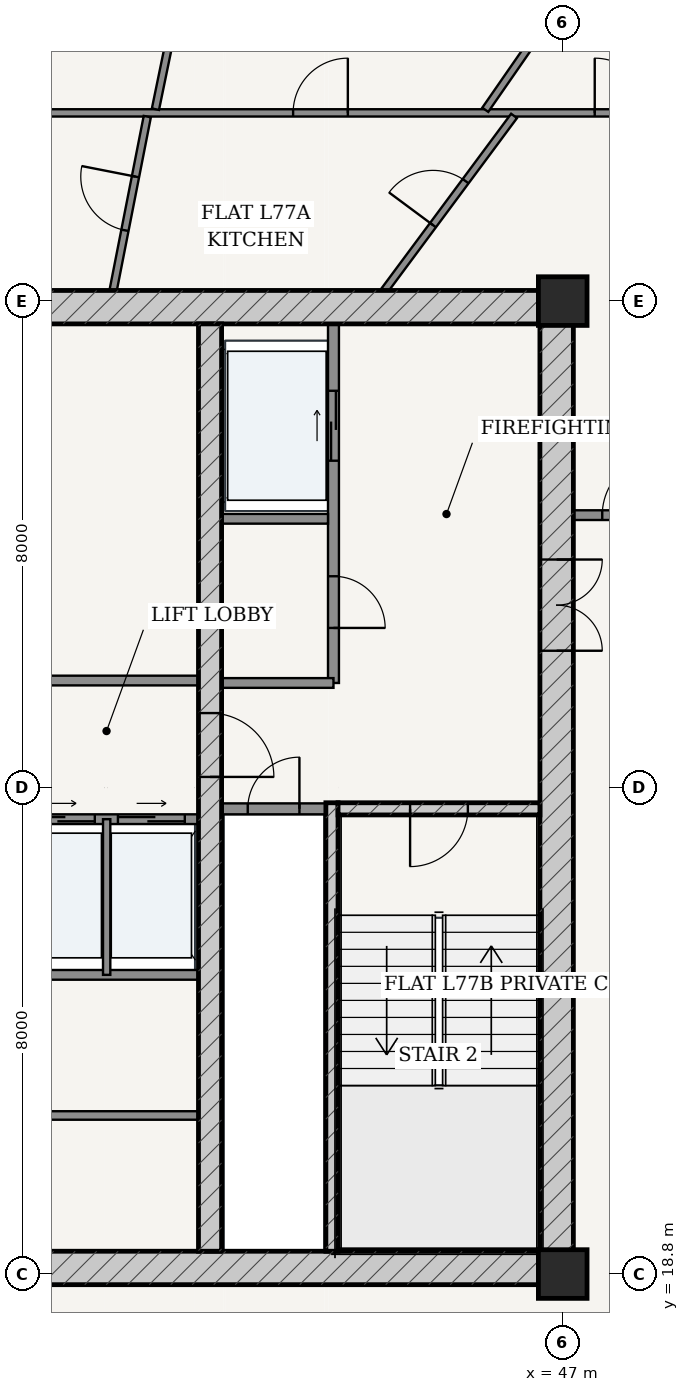
"""IFC4 building model, lengths in metres.
Left out: names, types, materials, properties, quantities, classifications, styles, units other than length and angle.
Written with IfcOpenShell. Run it as: python <this file> out.ifc"""

import sys

from ifc_helpers import new_model, si_unit, direction, frame, frame_2d, origin, origin_2d, place, context, subcontext, project, spatial, rectangle, extrude, source, transform, mapped, element, fill, save


model = new_model("IFC4")
c1 = context("Model", 3, precision=1e-05, world=origin(), true_north=direction((-0.2419218956, 0.970295726276)))
c2 = subcontext(c1, "Body", "Model", "MODEL_VIEW")
j1 = project(units=[si_unit("LENGTHUNIT", "METRE"), si_unit("PLANEANGLEUNIT", "RADIAN")], contexts=[c1])
p1 = place(None, origin())
s1 = spatial("IfcSite", under=j1, at=p1, CompositionType="ELEMENT")
p2 = place(p1, origin())
s2 = spatial("IfcBuilding", under=s1, at=p2, CompositionType="ELEMENT")
p3 = place(p2, frame((0.0, 0.0, 293.2)))
s3 = spatial("IfcBuildingStorey", under=s2, at=p3, CompositionType="ELEMENT", Elevation=293.2)
for number, where, z_axis, x_axis in (
    (1, (47.0, 18.8, 0.0), (0.0, 0.0, 1.0), (1.0, 0.0, 0.0)),
    (2, (47.0, 34.8, 0.0), (0.0, 0.0, 1.0), (1.0, 0.0, 0.0)),
):
    element("IfcColumn", number, at=place(p3, frame(where, z_axis=z_axis, x_axis=x_axis)), inside=s3, PredefinedType="COLUMN", context=c2, shape_type="SweptSolid", body=[
        extrude(rectangle(XDim=0.8, YDim=0.8, at=origin_2d()), origin(), (0.0, 0.0, 1.0), 3.75),
    ])
p4 = place(p3, frame((28.825, 18.9, 0.0), z_axis=(0.0, 0.0, 1.0), x_axis=(1.0, 0.0, 0.0)))
e3 = element("IfcWall", 3, at=p4, inside=s3, PredefinedType="SHEAR", context=c2, shape_type="SweptSolid", body=[
    extrude(rectangle(XDim=18.35, YDim=0.55, at=frame_2d((9.175, 0.0))), origin(), (0.0, 0.0, 1.0), 3.49),
])
p5 = place(p4, frame((8.75, 0.0, 0.0)))
e4 = element("IfcOpeningElement", 4, at=p5, cuts=e3, PredefinedType="OPENING", context=c2, shape_type="SweptSolid", body=[
    extrude(rectangle(XDim=0.85, YDim=2.1, at=frame_2d((0.425, 1.05))), frame((0.0, 0.285, 0.0), z_axis=(0.0, -1.0, 0.0), x_axis=(1.0, 0.0, 0.0)), (0.0, 0.0, 1.0), 0.57),
])
p6 = place(p3, frame((28.825, 34.7, 0.0), z_axis=(0.0, 0.0, 1.0), x_axis=(1.0, 0.0, 0.0)))
e5 = element("IfcWall", 5, at=p6, inside=s3, PredefinedType="SHEAR", context=c2, shape_type="SweptSolid", body=[
    extrude(rectangle(XDim=18.35, YDim=0.55, at=frame_2d((9.175, 0.0))), origin(), (0.0, 0.0, 1.0), 3.49),
])
p7 = place(p3, frame((46.9, 19.175, 0.0), z_axis=(0.0, 0.0, 1.0), x_axis=(0.0, 1.0, 0.0)))
e6 = element("IfcWall", 6, at=p7, inside=s3, PredefinedType="SHEAR", context=c2, shape_type="SweptSolid", body=[
    extrude(rectangle(XDim=15.25, YDim=0.55, at=frame_2d((7.625, 0.0))), origin(), (0.0, 0.0, 1.0), 3.49),
])
p8 = place(p7, frame((9.875, 0.0, 0.0)))
e7 = element("IfcOpeningElement", 7, at=p8, cuts=e6, PredefinedType="OPENING", context=c2, shape_type="SweptSolid", body=[
    extrude(rectangle(XDim=1.5, YDim=2.2, at=frame_2d((0.75, 1.1))), frame((0.0, 0.285, 0.0), z_axis=(0.0, -1.0, 0.0), x_axis=(1.0, 0.0, 0.0)), (0.0, 0.0, 1.0), 0.57),
])
p9 = place(p3, frame((43.205, 19.175, 0.0), z_axis=(0.0, 0.0, 1.0), x_axis=(0.0, 1.0, 0.0)))
e8 = element("IfcWall", 8, at=p9, inside=s3, PredefinedType="SOLIDWALL", context=c2, shape_type="SweptSolid", body=[
    extrude(rectangle(XDim=7.375, YDim=0.2, at=frame_2d((3.688, 0.0))), origin(), (0.0, 0.0, 1.0), 3.49),
])
p10 = place(p3, frame((43.305, 26.45, 0.0), z_axis=(0.0, 0.0, 1.0), x_axis=(1.0, 0.0, 0.0)))
e9 = element("IfcWall", 9, at=p10, inside=s3, PredefinedType="SOLIDWALL", context=c2, shape_type="SweptSolid", body=[
    extrude(rectangle(XDim=3.32, YDim=0.2, at=frame_2d((1.66, 0.0))), origin(), (0.0, 0.0, 1.0), 3.49),
])
p11 = place(p10, frame((1.185, 0.0, 0.0)))
e10 = element("IfcOpeningElement", 10, at=p11, cuts=e9, PredefinedType="OPENING", context=c2, shape_type="SweptSolid", body=[
    extrude(rectangle(XDim=0.95, YDim=2.15, at=frame_2d((0.475, 1.075))), frame((0.0, 0.11, 0.0), z_axis=(0.0, -1.0, 0.0), x_axis=(1.0, 0.0, 0.0)), (0.0, 0.0, 1.0), 0.22),
])
p12 = place(p3, frame((41.2, 19.175, 0.0), z_axis=(0.0, 0.0, 1.0), x_axis=(0.0, 1.0, 0.0)))
e11 = element("IfcWall", 11, at=p12, inside=s3, PredefinedType="SHEAR", context=c2, shape_type="SweptSolid", body=[
    extrude(rectangle(XDim=15.25, YDim=0.38, at=frame_2d((7.625, 0.0))), origin(), (0.0, 0.0, 1.0), 3.49),
])
p13 = place(p12, frame((7.8, 0.0, 0.0)))
e12 = element("IfcOpeningElement", 12, at=p13, cuts=e11, PredefinedType="OPENING", context=c2, shape_type="SweptSolid", body=[
    extrude(rectangle(XDim=1.05, YDim=2.15, at=frame_2d((0.525, 1.075))), frame((0.0, 0.2, 0.0), z_axis=(0.0, -1.0, 0.0), x_axis=(1.0, 0.0, 0.0)), (0.0, 0.0, 1.0), 0.4),
])
p14 = place(p3, frame((41.39, 26.45, 0.0), z_axis=(0.0, 0.0, 1.0), x_axis=(1.0, 0.0, 0.0)))
e13 = element("IfcWall", 13, at=p14, inside=s3, PredefinedType="PARTITIONING", context=c2, shape_type="SweptSolid", body=[
    extrude(rectangle(XDim=1.71, YDim=0.18, at=frame_2d((0.855, 0.0))), origin(), (0.0, 0.0, 1.0), 3.49),
])
p15 = place(p14, frame((0.43, 0.0, 0.0)))
e14 = element("IfcOpeningElement", 14, at=p15, cuts=e13, PredefinedType="OPENING", context=c2, shape_type="SweptSolid", body=[
    extrude(rectangle(XDim=0.85, YDim=2.1, at=frame_2d((0.425, 1.05))), frame((0.0, 0.1, 0.0), z_axis=(0.0, -1.0, 0.0), x_axis=(1.0, 0.0, 0.0)), (0.0, 0.0, 1.0), 0.2),
])
p16 = place(p3, frame((43.23, 28.52, 0.0), z_axis=(0.0, 0.0, 1.0), x_axis=(0.0, 1.0, 0.0)))
e15 = element("IfcWall", 15, at=p16, inside=s3, PredefinedType="PARTITIONING", context=c2, shape_type="SweptSolid", body=[
    extrude(rectangle(XDim=5.905, YDim=0.18, at=frame_2d((2.953, 0.0))), origin(), (0.0, 0.0, 1.0), 3.49),
])
p17 = place(p16, frame((0.905, 0.0, 0.0)))
e16 = element("IfcOpeningElement", 16, at=p17, cuts=e15, PredefinedType="OPENING", context=c2, shape_type="SweptSolid", body=[
    extrude(rectangle(XDim=0.85, YDim=2.1, at=frame_2d((0.425, 1.05))), frame((0.0, 0.1, 0.0), z_axis=(0.0, -1.0, 0.0), x_axis=(1.0, 0.0, 0.0)), (0.0, 0.0, 1.0), 0.2),
])
p18 = place(p16, frame((3.655, 0.0, 0.0)))
e17 = element("IfcOpeningElement", 17, at=p18, cuts=e15, PredefinedType="OPENING", context=c2, shape_type="SweptSolid", body=[
    extrude(rectangle(XDim=1.15, YDim=2.2, at=frame_2d((0.575, 1.1))), frame((0.0, 0.1, 0.0), z_axis=(0.0, -1.0, 0.0), x_axis=(1.0, 0.0, 0.0)), (0.0, 0.0, 1.0), 0.2),
])
p19 = place(p3, frame((41.39, 31.22, 0.0), z_axis=(0.0, 0.0, 1.0), x_axis=(1.0, 0.0, 0.0)))
e18 = element("IfcWall", 18, at=p19, inside=s3, PredefinedType="PARTITIONING", context=c2, shape_type="SweptSolid", body=[
    extrude(rectangle(XDim=1.75, YDim=0.16, at=frame_2d((0.875, 0.0))), origin(), (0.0, 0.0, 1.0), 3.49),
])
p20 = place(p3, frame((41.39, 28.52, 0.0), z_axis=(0.0, 0.0, 1.0), x_axis=(1.0, 0.0, 0.0)))
e19 = element("IfcWall", 19, at=p20, inside=s3, PredefinedType="PARTITIONING", context=c2, shape_type="SweptSolid", body=[
    extrude(rectangle(XDim=1.84, YDim=0.16, at=frame_2d((0.92, 0.0))), origin(), (0.0, 0.0, 1.0), 3.49),
])
p21 = place(p3, frame((34.99, 28.56, 0.0), z_axis=(0.0, 0.0, 1.0), x_axis=(1.0, 0.0, 0.0)))
e20 = element("IfcWall", 20, at=p21, inside=s3, PredefinedType="PARTITIONING", context=c2, shape_type="SweptSolid", body=[
    extrude(rectangle(XDim=6.02, YDim=0.16, at=frame_2d((3.01, 0.0))), origin(), (0.0, 0.0, 1.0), 3.49),
])
p22 = place(p21, frame((2.585, 0.0, 0.0)))
e21 = element("IfcOpeningElement", 21, at=p22, cuts=e20, PredefinedType="OPENING", context=c2, shape_type="SweptSolid", body=[
    extrude(rectangle(XDim=0.85, YDim=2.1, at=frame_2d((0.425, 1.05))), frame((0.0, 0.09, 0.0), z_axis=(0.0, -1.0, 0.0), x_axis=(1.0, 0.0, 0.0)), (0.0, 0.0, 1.0), 0.18),
])
p23 = place(p3, frame((34.99, 26.28, 0.0), z_axis=(0.0, 0.0, 1.0), x_axis=(1.0, 0.0, 0.0)))
e22 = element("IfcWall", 22, at=p23, inside=s3, PredefinedType="PARTITIONING", context=c2, shape_type="SweptSolid", body=[
    extrude(rectangle(XDim=6.02, YDim=0.16, at=frame_2d((3.01, 0.0))), origin(), (0.0, 0.0, 1.0), 3.49),
])
p24 = place(p23, frame((1.045, 0.0, 0.0)))
e23 = element("IfcOpeningElement", 23, at=p24, cuts=e22, PredefinedType="OPENING", context=c2, shape_type="SweptSolid", body=[
    extrude(rectangle(XDim=0.85, YDim=2.1, at=frame_2d((0.425, 1.05))), frame((0.0, 0.09, 0.0), z_axis=(0.0, -1.0, 0.0), x_axis=(1.0, 0.0, 0.0)), (0.0, 0.0, 1.0), 0.18),
])
p25 = place(p23, frame((3.215, 0.0, 0.0)))
e24 = element("IfcOpeningElement", 24, at=p25, cuts=e22, PredefinedType="OPENING", context=c2, shape_type="SweptSolid", body=[
    extrude(rectangle(XDim=1.1, YDim=2.2, at=frame_2d((0.55, 1.1))), frame((0.0, 0.09, 0.0), z_axis=(0.0, -1.0, 0.0), x_axis=(1.0, 0.0, 0.0)), (0.0, 0.0, 1.0), 0.18),
])
p26 = place(p23, frame((4.695, 0.0, 0.0)))
e25 = element("IfcOpeningElement", 25, at=p26, cuts=e22, PredefinedType="OPENING", context=c2, shape_type="SweptSolid", body=[
    extrude(rectangle(XDim=1.1, YDim=2.2, at=frame_2d((0.55, 1.1))), frame((0.0, 0.09, 0.0), z_axis=(0.0, -1.0, 0.0), x_axis=(1.0, 0.0, 0.0)), (0.0, 0.0, 1.0), 0.18),
])
p27 = place(p3, frame((34.99, 23.72, 0.0), z_axis=(0.0, 0.0, 1.0), x_axis=(1.0, 0.0, 0.0)))
e26 = element("IfcWall", 26, at=p27, inside=s3, PredefinedType="PARTITIONING", context=c2, shape_type="SweptSolid", body=[
    extrude(rectangle(XDim=6.02, YDim=0.16, at=frame_2d((3.01, 0.0))), origin(), (0.0, 0.0, 1.0), 3.49),
])
p28 = place(p3, frame((39.5, 23.72, 0.0), z_axis=(0.0, 0.0, 1.0), x_axis=(0.0, 1.0, 0.0)))
e27 = element("IfcWall", 27, at=p28, inside=s3, PredefinedType="PARTITIONING", context=c2, shape_type="SweptSolid", body=[
    extrude(rectangle(XDim=2.56, YDim=0.12, at=frame_2d((1.28, 0.0))), origin(), (0.0, 0.0, 1.0), 3.49),
])
p29 = place(p3, frame((34.99, 21.407, 0.0), z_axis=(0.0, 0.0, 1.0), x_axis=(1.0, 0.0, 0.0)))
e28 = element("IfcWall", 28, at=p29, inside=s3, PredefinedType="PARTITIONING", context=c2, shape_type="SweptSolid", body=[
    extrude(rectangle(XDim=6.02, YDim=0.14, at=frame_2d((3.01, 0.0))), origin(), (0.0, 0.0, 1.0), 3.49),
])
p30 = place(p29, frame((2.585, 0.0, 0.0)))
e29 = element("IfcOpeningElement", 29, at=p30, cuts=e28, PredefinedType="OPENING", context=c2, shape_type="SweptSolid", body=[
    extrude(rectangle(XDim=0.85, YDim=2.1, at=frame_2d((0.425, 1.05))), frame((0.0, 0.08, 0.0), z_axis=(0.0, -1.0, 0.0), x_axis=(1.0, 0.0, 0.0)), (0.0, 0.0, 1.0), 0.16),
])
p31 = place(p3, frame((47.175, 31.28, 0.0), z_axis=(0.0, 0.0, 1.0), x_axis=(1.0, 0.0, 0.0)))
e30 = element("IfcWall", 30, at=p31, inside=s3, PredefinedType="PARTITIONING", context=c2, shape_type="SweptSolid", body=[
    extrude(rectangle(XDim=1.93, YDim=0.16, at=frame_2d((0.965, 0.0))), origin(), (0.0, 0.0, 1.0), 3.49),
])
p32 = place(p31, frame((0.475, 0.0, 0.0)))
e31 = element("IfcOpeningElement", 31, at=p32, cuts=e30, PredefinedType="OPENING", context=c2, shape_type="SweptSolid", body=[
    extrude(rectangle(XDim=0.98, YDim=2.2, at=frame_2d((0.49, 1.1))), frame((0.0, 0.09, 0.0), z_axis=(0.0, -1.0, 0.0), x_axis=(1.0, 0.0, 0.0)), (0.0, 0.0, 1.0), 0.18),
])
p33 = place(p3, frame((25.905, 37.895, 0.0), z_axis=(0.0, 0.0, 1.0), x_axis=(1.0, 0.0, 0.0)))
e32 = element("IfcWall", 32, at=p33, inside=s3, PredefinedType="PARTITIONING", context=c2, shape_type="SweptSolid", body=[
    extrude(rectangle(XDim=24.19, YDim=0.12, at=frame_2d((12.095, 0.0))), origin(), (0.0, 0.0, 1.0), 3.015),
])
p34 = place(p33, frame((21.621, 0.0, 0.0)))
e33 = element("IfcOpeningElement", 33, at=p34, cuts=e32, PredefinedType="OPENING", context=c2, shape_type="SweptSolid", body=[
    extrude(rectangle(XDim=0.9, YDim=2.15, at=frame_2d((0.45, 1.075))), frame((0.0, 0.07, 0.0), z_axis=(0.0, -1.0, 0.0), x_axis=(1.0, 0.0, 0.0)), (0.0, 0.0, 1.0), 0.14),
])
p35 = place(p33, frame((16.661, 0.0, 0.0)))
e34 = element("IfcOpeningElement", 34, at=p35, cuts=e32, PredefinedType="OPENING", context=c2, shape_type="SweptSolid", body=[
    extrude(rectangle(XDim=0.9, YDim=2.15, at=frame_2d((0.45, 1.075))), frame((0.0, 0.07, 0.0), z_axis=(0.0, -1.0, 0.0), x_axis=(1.0, 0.0, 0.0)), (0.0, 0.0, 1.0), 0.14),
])
p36 = place(p33, frame((1.872, 0.0, 0.0)))
e35 = element("IfcOpeningElement", 35, at=p36, cuts=e32, PredefinedType="OPENING", context=c2, shape_type="SweptSolid", body=[
    extrude(rectangle(XDim=0.9, YDim=2.15, at=frame_2d((0.45, 1.075))), frame((0.0, 0.07, 0.0), z_axis=(0.0, -1.0, 0.0), x_axis=(1.0, 0.0, 0.0)), (0.0, 0.0, 1.0), 0.14),
])
p37 = place(p3, frame((45.726, 37.946, 0.0), z_axis=(0.0, 0.0, 1.0), x_axis=(0.569678410446, 0.821867695357, 0.0)))
e36 = element("IfcWall", 36, at=p37, inside=s3, PredefinedType="PARTITIONING", context=c2, shape_type="SweptSolid", body=[
    extrude(rectangle(XDim=5.257, YDim=0.12, at=frame_2d((2.628, 0.0))), origin(), (0.0, 0.0, 1.0), 3.015),
])
p38 = place(p3, frame((40.302, 37.956, 0.0), z_axis=(0.0, 0.0, 1.0), x_axis=(0.20211361456, 0.979362081566, 0.0)))
e37 = element("IfcWall", 37, at=p38, inside=s3, PredefinedType="PARTITIONING", context=c2, shape_type="SweptSolid", body=[
    extrude(rectangle(XDim=7.237, YDim=0.12, at=frame_2d((3.618, 0.0))), origin(), (0.0, 0.0, 1.0), 3.015),
])
p39 = place(p38, frame((2.154, 0.0, 0.0)))
e38 = element("IfcOpeningElement", 38, at=p39, cuts=e37, PredefinedType="OPENING", context=c2, shape_type="SweptSolid", body=[
    extrude(rectangle(XDim=0.9, YDim=2.15, at=frame_2d((0.45, 1.075))), frame((0.0, 0.07, 0.0), z_axis=(0.0, -1.0, 0.0), x_axis=(1.0, 0.0, 0.0)), (0.0, 0.0, 1.0), 0.14),
])
p40 = place(p3, frame((44.07, 34.977, 0.0), z_axis=(0.0, 0.0, 1.0), x_axis=(0.596034582173, 0.802958764106, 0.0)))
e39 = element("IfcWall", 39, at=p40, inside=s3, PredefinedType="PARTITIONING", context=c2, shape_type="SweptSolid", body=[
    extrude(rectangle(XDim=3.573, YDim=0.12, at=frame_2d((1.786, 0.0))), origin(), (0.0, 0.0, 1.0), 3.49),
])
p41 = place(p40, frame((1.336, 0.0, 0.0)))
e40 = element("IfcOpeningElement", 40, at=p41, cuts=e39, PredefinedType="OPENING", context=c2, shape_type="SweptSolid", body=[
    extrude(rectangle(XDim=0.9, YDim=2.15, at=frame_2d((0.45, 1.075))), frame((0.0, 0.07, 0.0), z_axis=(0.0, -1.0, 0.0), x_axis=(1.0, 0.0, 0.0)), (0.0, 0.0, 1.0), 0.14),
])
p42 = place(p3, frame((39.607, 34.977, 0.0), z_axis=(0.0, 0.0, 1.0), x_axis=(0.192841890083, 0.981229843324, 0.0)))
e41 = element("IfcWall", 41, at=p42, inside=s3, PredefinedType="PARTITIONING", context=c2, shape_type="SweptSolid", body=[
    extrude(rectangle(XDim=2.912, YDim=0.12, at=frame_2d((1.456, 0.0))), origin(), (0.0, 0.0, 1.0), 2.575),
])
p43 = place(p42, frame((1.006, 0.0, 0.0)))
e42 = element("IfcOpeningElement", 42, at=p43, cuts=e41, PredefinedType="OPENING", context=c2, shape_type="SweptSolid", body=[
    extrude(rectangle(XDim=0.9, YDim=2.15, at=frame_2d((0.45, 1.075))), frame((0.0, 0.07, 0.0), z_axis=(0.0, -1.0, 0.0), x_axis=(1.0, 0.0, 0.0)), (0.0, 0.0, 1.0), 0.14),
])
m1 = source(origin(), c2, "Body", "SweptSolid", [
    extrude(rectangle(XDim=1.5, YDim=2.2, at=frame_2d((0.75, 1.1))), frame((0.0, 0.025, 0.0), z_axis=(0.0, -1.0, 0.0), x_axis=(1.0, 0.0, 0.0)), (0.0, 0.0, 1.0), 0.05),
])
p44 = place(p8, frame((1.5, 0.0, 0.0), z_axis=(0.0, 0.0, 1.0), x_axis=(-1.0, 0.0, 0.0)))
e43 = element("IfcDoor", 43, at=p44, inside=s3, OperationType="DOUBLE_DOOR_SINGLE_SWING", PredefinedType="DOOR", context=c2, shape_type="MappedRepresentation", body=[
    mapped(m1, transform((0.0, 0.0, 0.0), scale=1.0)),
])
fill(e7, e43)
m2 = source(origin(), c2, "Body", "SweptSolid", [
    extrude(rectangle(XDim=1.05, YDim=2.15, at=frame_2d((0.525, 1.075))), frame((0.0, 0.025, 0.0), z_axis=(0.0, -1.0, 0.0), x_axis=(1.0, 0.0, 0.0)), (0.0, 0.0, 1.0), 0.05),
])
p45 = place(p13, frame((1.05, 0.0, 0.0), z_axis=(0.0, 0.0, 1.0), x_axis=(-1.0, 0.0, 0.0)))
e44 = element("IfcDoor", 44, at=p45, inside=s3, OperationType="SINGLE_SWING_RIGHT", PredefinedType="DOOR", context=c2, shape_type="MappedRepresentation", body=[
    mapped(m2, transform((0.0, 0.0, 0.0), scale=1.0)),
])
fill(e12, e44)
m3 = source(origin(), c2, "Body", "SweptSolid", [
    extrude(rectangle(XDim=0.95, YDim=2.15, at=frame_2d((0.475, 1.075))), frame((0.0, 0.025, 0.0), z_axis=(0.0, -1.0, 0.0), x_axis=(1.0, 0.0, 0.0)), (0.0, 0.0, 1.0), 0.05),
])
p46 = place(p11, frame((0.95, 0.0, 0.0), z_axis=(0.0, 0.0, 1.0), x_axis=(-1.0, 0.0, 0.0)))
e45 = element("IfcDoor", 45, at=p46, inside=s3, OperationType="SINGLE_SWING_RIGHT", PredefinedType="DOOR", context=c2, shape_type="MappedRepresentation", body=[
    mapped(m3, transform((0.0, 0.0, 0.0), scale=1.0)),
])
fill(e10, e45)
m4 = source(origin(), c2, "Body", "SweptSolid", [
    extrude(rectangle(XDim=0.85, YDim=2.1, at=frame_2d((0.425, 1.05))), frame((0.0, 0.025, 0.0), z_axis=(0.0, -1.0, 0.0), x_axis=(1.0, 0.0, 0.0)), (0.0, 0.0, 1.0), 0.05),
])
p47 = place(p15, origin())
e46 = element("IfcDoor", 46, at=p47, inside=s3, OperationType="SINGLE_SWING_RIGHT", PredefinedType="DOOR", context=c2, shape_type="MappedRepresentation", body=[
    mapped(m4, transform((0.0, 0.0, 0.0), scale=1.0)),
])
fill(e14, e46)
p48 = place(p17, frame((0.85, 0.0, 0.0), z_axis=(0.0, 0.0, 1.0), x_axis=(-1.0, 0.0, 0.0)))
e47 = element("IfcDoor", 47, at=p48, inside=s3, OperationType="SINGLE_SWING_RIGHT", PredefinedType="DOOR", context=c2, shape_type="MappedRepresentation", body=[
    mapped(m4, transform((0.0, 0.0, 0.0), scale=1.0)),
])
fill(e16, e47)
m5 = source(origin(), c2, "Body", "SweptSolid", [
    extrude(rectangle(XDim=1.15, YDim=2.2, at=frame_2d((0.575, 1.1))), frame((0.0, 0.025, 0.0), z_axis=(0.0, -1.0, 0.0), x_axis=(1.0, 0.0, 0.0)), (0.0, 0.0, 1.0), 0.05),
])
p49 = place(p18, origin())
e48 = element("IfcDoor", 48, at=p49, inside=s3, OperationType="DOUBLE_DOOR_SLIDING", PredefinedType="DOOR", context=c2, shape_type="MappedRepresentation", body=[
    mapped(m5, transform((0.0, 0.0, 0.0), scale=1.0)),
])
fill(e17, e48)
m6 = source(origin(), c2, "Body", "SweptSolid", [
    extrude(rectangle(XDim=1.1, YDim=2.2, at=frame_2d((0.55, 1.1))), frame((0.0, 0.025, 0.0), z_axis=(0.0, -1.0, 0.0), x_axis=(1.0, 0.0, 0.0)), (0.0, 0.0, 1.0), 0.05),
])
p50 = place(p25, origin())
e49 = element("IfcDoor", 49, at=p50, inside=s3, OperationType="DOUBLE_DOOR_SLIDING", PredefinedType="DOOR", context=c2, shape_type="MappedRepresentation", body=[
    mapped(m6, transform((0.0, 0.0, 0.0), scale=1.0)),
])
fill(e24, e49)
p51 = place(p26, origin())
e50 = element("IfcDoor", 50, at=p51, inside=s3, OperationType="DOUBLE_DOOR_SLIDING", PredefinedType="DOOR", context=c2, shape_type="MappedRepresentation", body=[
    mapped(m6, transform((0.0, 0.0, 0.0), scale=1.0)),
])
fill(e25, e50)
m7 = source(origin(), c2, "Body", "SweptSolid", [
    extrude(rectangle(XDim=0.98, YDim=2.2, at=frame_2d((0.49, 1.1))), frame((0.0, 0.025, 0.0), z_axis=(0.0, -1.0, 0.0), x_axis=(1.0, 0.0, 0.0)), (0.0, 0.0, 1.0), 0.05),
])
p52 = place(p32, origin())
e51 = element("IfcDoor", 51, at=p52, inside=s3, OperationType="SINGLE_SWING_RIGHT", PredefinedType="DOOR", context=c2, shape_type="MappedRepresentation", body=[
    mapped(m7, transform((0.0, 0.0, 0.0), scale=1.0)),
])
fill(e31, e51)
m8 = source(origin(), c2, "Body", "SweptSolid", [
    extrude(rectangle(XDim=0.9, YDim=2.15, at=frame_2d((0.45, 1.075))), frame((0.0, 0.025, 0.0), z_axis=(0.0, -1.0, 0.0), x_axis=(1.0, 0.0, 0.0)), (0.0, 0.0, 1.0), 0.05),
])
p53 = place(p41, origin())
e52 = element("IfcDoor", 52, at=p53, inside=s3, OperationType="SINGLE_SWING_LEFT", PredefinedType="DOOR", context=c2, shape_type="MappedRepresentation", body=[
    mapped(m8, transform((0.0, 0.0, 0.0), scale=1.0)),
])
fill(e40, e52)
p54 = place(p43, origin())
e53 = element("IfcDoor", 53, at=p54, inside=s3, OperationType="SINGLE_SWING_RIGHT", PredefinedType="DOOR", context=c2, shape_type="MappedRepresentation", body=[
    mapped(m8, transform((0.0, 0.0, 0.0), scale=1.0)),
])
fill(e42, e53)
p55 = place(p34, origin())
e54 = element("IfcDoor", 54, at=p55, inside=s3, OperationType="SINGLE_SWING_LEFT", PredefinedType="DOOR", context=c2, shape_type="MappedRepresentation", body=[
    mapped(m8, transform((0.0, 0.0, 0.0), scale=1.0)),
])
fill(e33, e54)
p56 = place(p35, origin())
e55 = element("IfcDoor", 55, at=p56, inside=s3, OperationType="SINGLE_SWING_RIGHT", PredefinedType="DOOR", context=c2, shape_type="MappedRepresentation", body=[
    mapped(m8, transform((0.0, 0.0, 0.0), scale=1.0)),
])
fill(e34, e55)
save(model, sys.argv[1])
